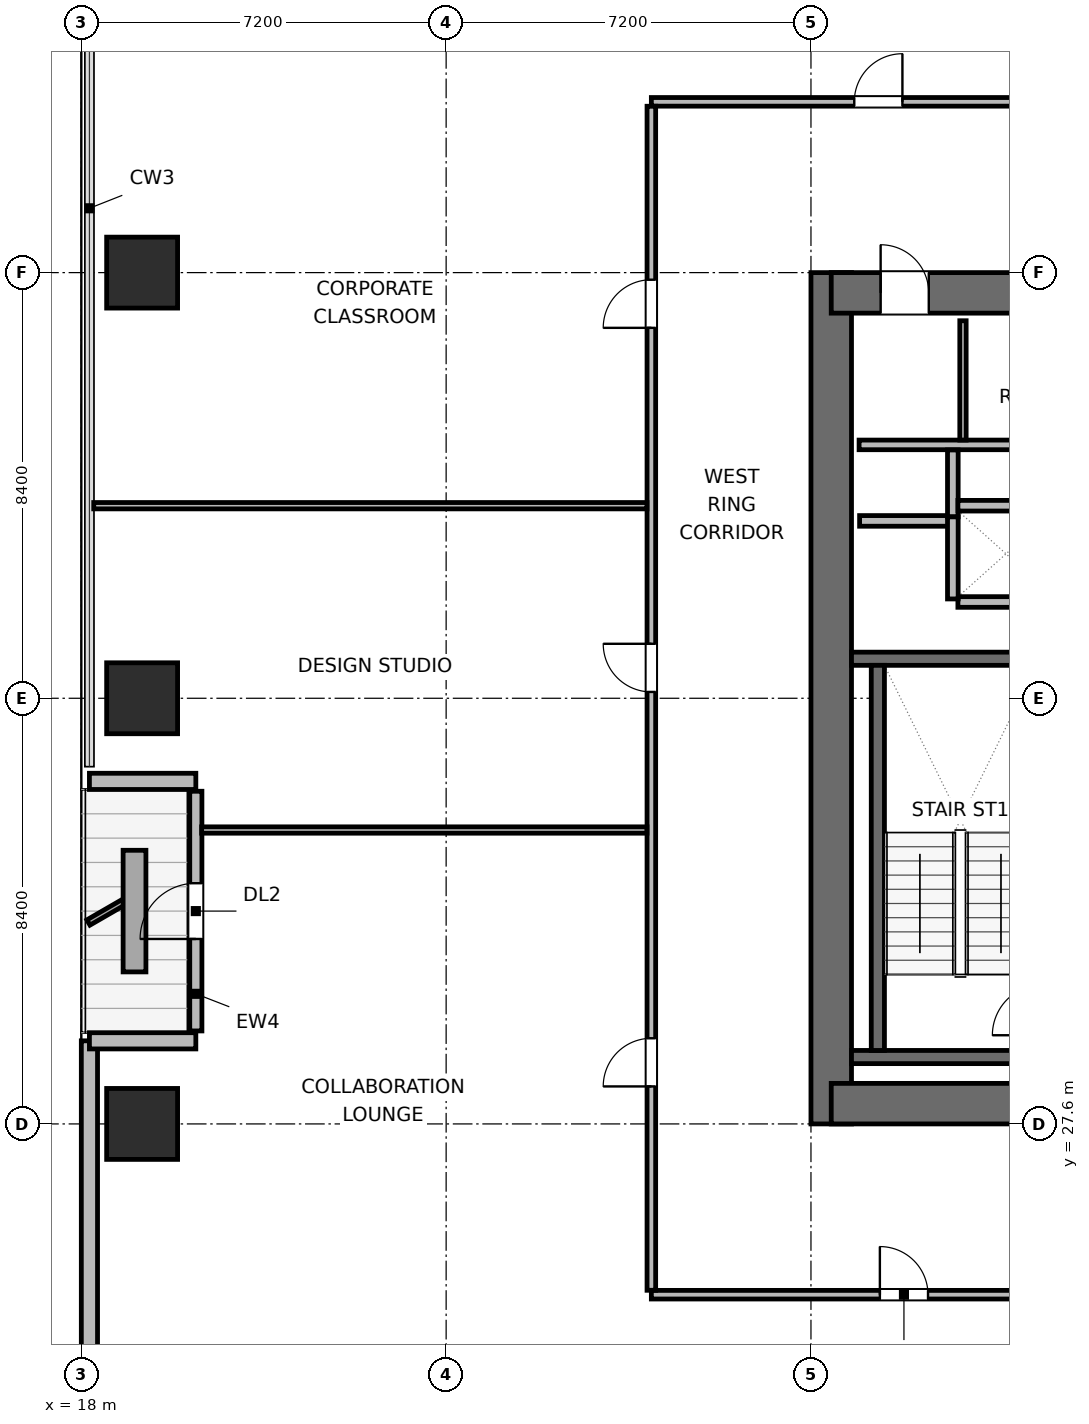
"""IFC4 building model, lengths in metres.
Left out: names, types, materials, properties, quantities, classifications, styles, units other than length and angle.
Written with IfcOpenShell. Run it as: python <this file> out.ifc"""

import sys

from ifc_helpers import new_model, si_unit, direction, frame, frame_2d, origin, origin_2d, place, context, subcontext, project, spatial, rectangle, extrude, element, fill, save


model = new_model("IFC4")
c1 = context("Model", 3, precision=1e-05, world=origin(), true_north=direction((0.0, 1.0)))
c2 = subcontext(c1, "Body", "Model", "MODEL_VIEW")
j1 = project(units=[si_unit("LENGTHUNIT", "METRE"), si_unit("PLANEANGLEUNIT", "RADIAN")], contexts=[c1])
p1 = place(None, origin())
s1 = spatial("IfcSite", under=j1, at=p1, CompositionType="ELEMENT")
p2 = place(p1, origin())
s2 = spatial("IfcBuilding", under=s1, at=p2, CompositionType="ELEMENT")
p3 = place(p2, frame((0.0, 0.0, 93.6)))
s3 = spatial("IfcBuildingStorey", under=s2, at=p3, CompositionType="ELEMENT", Elevation=93.6)
p4 = place(p3, frame((32.8, 27.6, 0.0), z_axis=(0.0, 0.0, 1.0), x_axis=(0.0, 1.0, 0.0)))
e1 = element("IfcWall", 1, at=p4, inside=s3, PredefinedType="SHEAR", context=c2, shape_type="SweptSolid", body=[
    extrude(rectangle(XDim=16.8, YDim=0.8, at=frame_2d((8.4, 0.0))), origin(), (0.0, 0.0, 1.0), 3.9),
])
p5 = place(p3, frame((32.8, 28.0, 0.0), z_axis=(0.0, 0.0, 1.0), x_axis=(1.0, 0.0, 0.0)))
e2 = element("IfcWall", 2, at=p5, inside=s3, PredefinedType="SHEAR", context=c2, shape_type="SweptSolid", body=[
    extrude(rectangle(XDim=9.2, YDim=0.8, at=frame_2d((4.6, 0.0))), origin(), (0.0, 0.0, 1.0), 3.9),
])
p6 = place(p5, frame((4.975, 0.0, 0.0)))
e3 = element("IfcOpeningElement", 3, at=p6, cuts=e2, PredefinedType="OPENING", context=c2, shape_type="SweptSolid", body=[
    extrude(rectangle(XDim=1.05, YDim=2.04, at=frame_2d((0.525, 1.02))), frame((0.0, 0.41, 0.0), z_axis=(0.0, -1.0, 0.0), x_axis=(1.0, 0.0, 0.0)), (0.0, 0.0, 1.0), 0.82),
])
p7 = place(p3, frame((32.8, 44.0, 0.0), z_axis=(0.0, 0.0, 1.0), x_axis=(1.0, 0.0, 0.0)))
e4 = element("IfcWall", 4, at=p7, inside=s3, PredefinedType="SHEAR", context=c2, shape_type="SweptSolid", body=[
    extrude(rectangle(XDim=9.2, YDim=0.8, at=frame_2d((4.6, 0.0))), origin(), (0.0, 0.0, 1.0), 3.9),
])
p8 = place(p7, frame((0.975, 0.0, 0.0)))
e5 = element("IfcOpeningElement", 5, at=p8, cuts=e4, PredefinedType="OPENING", context=c2, shape_type="SweptSolid", body=[
    extrude(rectangle(XDim=0.95, YDim=2.04, at=frame_2d((0.475, 1.02))), frame((0.0, 0.41, 0.0), z_axis=(0.0, -1.0, 0.0), x_axis=(1.0, 0.0, 0.0)), (0.0, 0.0, 1.0), 0.82),
])
p9 = place(p7, frame((4.225, 0.0, 0.0)))
e6 = element("IfcOpeningElement", 6, at=p9, cuts=e4, PredefinedType="OPENING", context=c2, shape_type="SweptSolid", body=[
    extrude(rectangle(XDim=0.9, YDim=2.02, at=frame_2d((0.45, 1.01))), frame((0.0, 0.41, 0.0), z_axis=(0.0, -1.0, 0.0), x_axis=(1.0, 0.0, 0.0)), (0.0, 0.0, 1.0), 0.82),
])
p10 = place(p7, frame((7.125, 0.0, 0.0)))
e7 = element("IfcOpeningElement", 7, at=p10, cuts=e4, PredefinedType="OPENING", context=c2, shape_type="SweptSolid", body=[
    extrude(rectangle(XDim=0.9, YDim=2.02, at=frame_2d((0.45, 1.01))), frame((0.0, 0.41, 0.0), z_axis=(0.0, -1.0, 0.0), x_axis=(1.0, 0.0, 0.0)), (0.0, 0.0, 1.0), 0.82),
])
for number, where, z_axis, x_axis in (
    (8, (33.2, 28.92, 0.0), (0.0, 0.0, 1.0), (1.0, 0.0, 0.0)),
    (9, (33.2, 36.78, 0.0), (0.0, 0.0, 1.0), (1.0, 0.0, 0.0)),
):
    element("IfcWall", number, at=place(p3, frame(where, z_axis=z_axis, x_axis=x_axis)), inside=s3, PredefinedType="SHEAR", context=c2, shape_type="SweptSolid", body=[
        extrude(rectangle(XDim=3.91, YDim=0.26, at=frame_2d((1.955, 0.0))), origin(), (0.0, 0.0, 1.0), 3.9),
    ])
p11 = place(p3, frame((33.72, 29.05, 0.0), z_axis=(0.0, 0.0, 1.0), x_axis=(0.0, 1.0, 0.0)))
e10 = element("IfcWall", 10, at=p11, inside=s3, PredefinedType="SHEAR", context=c2, shape_type="SweptSolid", body=[
    extrude(rectangle(XDim=7.6, YDim=0.26, at=frame_2d((3.8, 0.0))), origin(), (0.0, 0.0, 1.0), 3.9),
])
for number, where, z_axis, x_axis in (
    (11, (19.2, 27.6, 0.0), (0.0, 0.0, 1.0), (1.0, 0.0, 0.0)),
    (12, (19.2, 36.0, 0.0), (0.0, 0.0, 1.0), (1.0, 0.0, 0.0)),
    (13, (19.2, 44.4, 0.0), (0.0, 0.0, 1.0), (1.0, 0.0, 0.0)),
):
    element("IfcColumn", number, at=place(p3, frame(where, z_axis=z_axis, x_axis=x_axis)), inside=s3, PredefinedType="COLUMN", context=c2, shape_type="SweptSolid", body=[
        extrude(rectangle(XDim=1.4, YDim=1.4, at=origin_2d()), origin(), (0.0, 0.0, 1.0), 3.9),
    ])
p12 = place(p3, frame((18.16, 15.021, 0.0), z_axis=(0.0, 0.0, 1.0), x_axis=(0.0, 1.0, 0.0)))
e14 = element("IfcWall", 14, at=p12, inside=s3, PredefinedType="SOLIDWALL", context=c2, shape_type="SweptSolid", body=[
    extrude(rectangle(XDim=14.219, YDim=0.32, at=frame_2d((7.109, 0.0))), origin(), (0.0, 0.0, 1.0), 3.64),
])
p13 = place(p3, frame((18.16, 29.24, 0.0), z_axis=(0.0, 0.0, 1.0), x_axis=(1.0, 0.0, 0.0)))
e15 = element("IfcWall", 15, at=p13, inside=s3, PredefinedType="SOLIDWALL", context=c2, shape_type="SweptSolid", body=[
    extrude(rectangle(XDim=2.1, YDim=0.32, at=frame_2d((1.05, 0.0))), origin(), (0.0, 0.0, 1.0), 2.875),
])
p14 = place(p3, frame((20.26, 29.435, 0.0), z_axis=(0.0, 0.0, 1.0), x_axis=(0.0, 1.0, 0.0)))
e16 = element("IfcWall", 16, at=p14, inside=s3, PredefinedType="SOLIDWALL", context=c2, shape_type="SweptSolid", body=[
    extrude(rectangle(XDim=4.73, YDim=0.24, at=frame_2d((2.365, 0.0))), origin(), (0.0, 0.0, 1.0), 3.162),
])
p15 = place(p14, frame((1.815, 0.0, 0.0)))
e17 = element("IfcOpeningElement", 17, at=p15, cuts=e16, PredefinedType="OPENING", context=c2, shape_type="SweptSolid", body=[
    extrude(rectangle(XDim=1.1, YDim=2.04, at=frame_2d((0.55, 1.02))), frame((0.0, 0.13, 0.0), z_axis=(0.0, -1.0, 0.0), x_axis=(1.0, 0.0, 0.0)), (0.0, 0.0, 1.0), 0.26),
])
p16 = place(p3, frame((20.26, 34.36, 0.0), z_axis=(0.0, 0.0, 1.0), x_axis=(-1.0, 0.0, 0.0)))
e18 = element("IfcWall", 18, at=p16, inside=s3, PredefinedType="SOLIDWALL", context=c2, shape_type="SweptSolid", body=[
    extrude(rectangle(XDim=2.1, YDim=0.32, at=frame_2d((1.05, 0.0))), origin(), (0.0, 0.0, 1.0), 2.875),
])
p17 = place(p3, frame((33.35, 41.0, 0.0), z_axis=(0.0, 0.0, 1.0), x_axis=(1.0, 0.0, 0.0)))
e19 = element("IfcWall", 19, at=p17, inside=s3, PredefinedType="PLUMBINGWALL", context=c2, shape_type="SweptSolid", body=[
    extrude(rectangle(XDim=8.1, YDim=0.19, at=frame_2d((4.05, 0.0))), origin(), (0.0, 0.0, 1.0), 3.64),
])
p18 = place(p3, frame((35.4, 41.095, 0.0), z_axis=(0.0, 0.0, 1.0), x_axis=(0.0, 1.0, 0.0)))
e20 = element("IfcWall", 20, at=p18, inside=s3, PredefinedType="PARTITIONING", context=c2, shape_type="SweptSolid", body=[
    extrude(rectangle(XDim=2.355, YDim=0.125, at=frame_2d((1.177, 0.0))), origin(), (0.0, 0.0, 1.0), 3.64),
])
p19 = place(p3, frame((33.36, 39.5, 0.0), z_axis=(0.0, 0.0, 1.0), x_axis=(1.0, 0.0, 0.0)))
e21 = element("IfcWall", 21, at=p19, inside=s3, PredefinedType="PARTITIONING", context=c2, shape_type="SweptSolid", body=[
    extrude(rectangle(XDim=1.86, YDim=0.21, at=frame_2d((0.93, 0.0))), origin(), (0.0, 0.0, 1.0), 3.64),
])
p20 = place(p3, frame((35.2, 39.58, 0.0), z_axis=(0.0, 0.0, 1.0), x_axis=(0.0, 1.0, 0.0)))
e22 = element("IfcWall", 22, at=p20, inside=s3, PredefinedType="PARTITIONING", context=c2, shape_type="SweptSolid", body=[
    extrude(rectangle(XDim=1.32, YDim=0.21, at=frame_2d((0.66, 0.0))), origin(), (0.0, 0.0, 1.0), 3.64),
])
for number, where, z_axis, x_axis in (
    (23, (35.3, 37.9, 0.0), (0.0, 0.0, 1.0), (1.0, 0.0, 0.0)),
    (24, (35.3, 39.8, 0.0), (0.0, 0.0, 1.0), (1.0, 0.0, 0.0)),
):
    element("IfcWall", number, at=place(p3, frame(where, z_axis=z_axis, x_axis=x_axis)), inside=s3, PredefinedType="PARTITIONING", context=c2, shape_type="SweptSolid", body=[
        extrude(rectangle(XDim=1.9, YDim=0.21, at=frame_2d((0.95, 0.0))), origin(), (0.0, 0.0, 1.0), 3.64),
    ])
p21 = place(p3, frame((35.2, 37.96, 0.0), z_axis=(0.0, 0.0, 1.0), x_axis=(0.0, 1.0, 0.0)))
e25 = element("IfcWall", 25, at=p21, inside=s3, PredefinedType="PARTITIONING", context=c2, shape_type="SweptSolid", body=[
    extrude(rectangle(XDim=1.62, YDim=0.21, at=frame_2d((0.81, 0.0))), origin(), (0.0, 0.0, 1.0), 3.64),
])
p22 = place(p3, frame((29.25, 24.23, 0.0), z_axis=(0.0, 0.0, 1.0), x_axis=(1.0, 0.0, 0.0)))
e26 = element("IfcWall", 26, at=p22, inside=s3, PredefinedType="PARTITIONING", context=c2, shape_type="SweptSolid", body=[
    extrude(rectangle(XDim=37.5, YDim=0.17, at=frame_2d((18.75, 0.0))), origin(), (0.0, 0.0, 1.0), 3.64),
])
p23 = place(p22, frame((4.51, 0.0, 0.0)))
e27 = element("IfcOpeningElement", 27, at=p23, cuts=e26, PredefinedType="OPENING", context=c2, shape_type="SweptSolid", body=[
    extrude(rectangle(XDim=0.95, YDim=2.04, at=frame_2d((0.475, 1.02))), frame((0.0, 0.095, 0.0), z_axis=(0.0, -1.0, 0.0), x_axis=(1.0, 0.0, 0.0)), (0.0, 0.0, 1.0), 0.19),
])
p24 = place(p22, frame((13.885, 0.0, 0.0)))
e28 = element("IfcOpeningElement", 28, at=p24, cuts=e26, PredefinedType="OPENING", context=c2, shape_type="SweptSolid", body=[
    extrude(rectangle(XDim=0.95, YDim=2.04, at=frame_2d((0.475, 1.02))), frame((0.0, 0.095, 0.0), z_axis=(0.0, -1.0, 0.0), x_axis=(1.0, 0.0, 0.0)), (0.0, 0.0, 1.0), 0.19),
])
p25 = place(p22, frame((22.66, 0.0, 0.0)))
e29 = element("IfcOpeningElement", 29, at=p25, cuts=e26, PredefinedType="OPENING", context=c2, shape_type="SweptSolid", body=[
    extrude(rectangle(XDim=0.95, YDim=2.04, at=frame_2d((0.475, 1.02))), frame((0.0, 0.095, 0.0), z_axis=(0.0, -1.0, 0.0), x_axis=(1.0, 0.0, 0.0)), (0.0, 0.0, 1.0), 0.19),
])
p26 = place(p22, frame((32.035, 0.0, 0.0)))
e30 = element("IfcOpeningElement", 30, at=p26, cuts=e26, PredefinedType="OPENING", context=c2, shape_type="SweptSolid", body=[
    extrude(rectangle(XDim=0.95, YDim=2.04, at=frame_2d((0.475, 1.02))), frame((0.0, 0.095, 0.0), z_axis=(0.0, -1.0, 0.0), x_axis=(1.0, 0.0, 0.0)), (0.0, 0.0, 1.0), 0.19),
])
p27 = place(p3, frame((29.25, 47.77, 0.0), z_axis=(0.0, 0.0, 1.0), x_axis=(1.0, 0.0, 0.0)))
e31 = element("IfcWall", 31, at=p27, inside=s3, PredefinedType="PARTITIONING", context=c2, shape_type="SweptSolid", body=[
    extrude(rectangle(XDim=37.5, YDim=0.17, at=frame_2d((18.75, 0.0))), origin(), (0.0, 0.0, 1.0), 3.64),
])
p28 = place(p27, frame((4.005, 0.0, 0.0)))
e32 = element("IfcOpeningElement", 32, at=p28, cuts=e31, PredefinedType="OPENING", context=c2, shape_type="SweptSolid", body=[
    extrude(rectangle(XDim=0.95, YDim=2.04, at=frame_2d((0.475, 1.02))), frame((0.0, 0.095, 0.0), z_axis=(0.0, -1.0, 0.0), x_axis=(1.0, 0.0, 0.0)), (0.0, 0.0, 1.0), 0.19),
])
p29 = place(p27, frame((10.07, 0.0, 0.0)))
e33 = element("IfcOpeningElement", 33, at=p29, cuts=e31, PredefinedType="OPENING", context=c2, shape_type="SweptSolid", body=[
    extrude(rectangle(XDim=0.95, YDim=2.04, at=frame_2d((0.475, 1.02))), frame((0.0, 0.095, 0.0), z_axis=(0.0, -1.0, 0.0), x_axis=(1.0, 0.0, 0.0)), (0.0, 0.0, 1.0), 0.19),
])
p30 = place(p27, frame((17.165, 0.0, 0.0)))
e34 = element("IfcOpeningElement", 34, at=p30, cuts=e31, PredefinedType="OPENING", context=c2, shape_type="SweptSolid", body=[
    extrude(rectangle(XDim=0.95, YDim=2.04, at=frame_2d((0.475, 1.02))), frame((0.0, 0.095, 0.0), z_axis=(0.0, -1.0, 0.0), x_axis=(1.0, 0.0, 0.0)), (0.0, 0.0, 1.0), 0.19),
])
p31 = place(p27, frame((25.37, 0.0, 0.0)))
e35 = element("IfcOpeningElement", 35, at=p31, cuts=e31, PredefinedType="OPENING", context=c2, shape_type="SweptSolid", body=[
    extrude(rectangle(XDim=0.95, YDim=2.04, at=frame_2d((0.475, 1.02))), frame((0.0, 0.095, 0.0), z_axis=(0.0, -1.0, 0.0), x_axis=(1.0, 0.0, 0.0)), (0.0, 0.0, 1.0), 0.19),
])
p32 = place(p27, frame((32.545, 0.0, 0.0)))
e36 = element("IfcOpeningElement", 36, at=p32, cuts=e31, PredefinedType="OPENING", context=c2, shape_type="SweptSolid", body=[
    extrude(rectangle(XDim=0.95, YDim=2.04, at=frame_2d((0.475, 1.02))), frame((0.0, 0.095, 0.0), z_axis=(0.0, -1.0, 0.0), x_axis=(1.0, 0.0, 0.0)), (0.0, 0.0, 1.0), 0.19),
])
p33 = place(p3, frame((29.25, 24.317, 0.0), z_axis=(0.0, 0.0, 1.0), x_axis=(0.0, 1.0, 0.0)))
e37 = element("IfcWall", 37, at=p33, inside=s3, PredefinedType="PARTITIONING", context=c2, shape_type="SweptSolid", body=[
    extrude(rectangle(XDim=23.366, YDim=0.17, at=frame_2d((11.683, 0.0))), origin(), (0.0, 0.0, 1.0), 3.64),
])
p34 = place(p33, frame((4.023, 0.0, 0.0)))
e38 = element("IfcOpeningElement", 38, at=p34, cuts=e37, PredefinedType="OPENING", context=c2, shape_type="SweptSolid", body=[
    extrude(rectangle(XDim=0.95, YDim=2.04, at=frame_2d((0.475, 1.02))), frame((0.0, 0.095, 0.0), z_axis=(0.0, -1.0, 0.0), x_axis=(1.0, 0.0, 0.0)), (0.0, 0.0, 1.0), 0.19),
])
p35 = place(p33, frame((11.808, 0.0, 0.0)))
e39 = element("IfcOpeningElement", 39, at=p35, cuts=e37, PredefinedType="OPENING", context=c2, shape_type="SweptSolid", body=[
    extrude(rectangle(XDim=0.95, YDim=2.04, at=frame_2d((0.475, 1.02))), frame((0.0, 0.095, 0.0), z_axis=(0.0, -1.0, 0.0), x_axis=(1.0, 0.0, 0.0)), (0.0, 0.0, 1.0), 0.19),
])
p36 = place(p33, frame((18.993, 0.0, 0.0)))
e40 = element("IfcOpeningElement", 40, at=p36, cuts=e37, PredefinedType="OPENING", context=c2, shape_type="SweptSolid", body=[
    extrude(rectangle(XDim=0.95, YDim=2.04, at=frame_2d((0.475, 1.02))), frame((0.0, 0.095, 0.0), z_axis=(0.0, -1.0, 0.0), x_axis=(1.0, 0.0, 0.0)), (0.0, 0.0, 1.0), 0.19),
])
p37 = place(p3, frame((20.375, 33.4, 0.0), z_axis=(0.0, 0.0, 1.0), x_axis=(1.0, 0.0, 0.0)))
e41 = element("IfcWall", 41, at=p37, inside=s3, PredefinedType="PARTITIONING", context=c2, shape_type="SweptSolid", body=[
    extrude(rectangle(XDim=8.788, YDim=0.125, at=frame_2d((4.394, 0.0))), origin(), (0.0, 0.0, 1.0), 3.64),
])
p38 = place(p3, frame((18.245, 39.8, 0.0), z_axis=(0.0, 0.0, 1.0), x_axis=(1.0, 0.0, 0.0)))
e42 = element("IfcWall", 42, at=p38, inside=s3, PredefinedType="PARTITIONING", context=c2, shape_type="SweptSolid", body=[
    extrude(rectangle(XDim=10.918, YDim=0.125, at=frame_2d((5.459, 0.0))), origin(), (0.0, 0.0, 1.0), 3.64),
])
p39 = place(p15, origin())
e43 = element("IfcDoor", 43, at=p39, inside=s3, OperationType="SINGLE_SWING_LEFT", PredefinedType="DOOR", context=c2, shape_type="SweptSolid", body=[
    extrude(rectangle(XDim=1.1, YDim=2.04, at=frame_2d((0.55, 1.02))), frame((0.0, 0.025, 0.0), z_axis=(0.0, -1.0, 0.0), x_axis=(1.0, 0.0, 0.0)), (0.0, 0.0, 1.0), 0.05),
])
fill(e17, e43)
p40 = place(p8, origin())
e44 = element("IfcDoor", 44, at=p40, inside=s3, OperationType="SINGLE_SWING_LEFT", PredefinedType="DOOR", context=c2, shape_type="SweptSolid", body=[
    extrude(rectangle(XDim=0.95, YDim=2.04, at=frame_2d((0.475, 1.02))), frame((0.0, 0.025, 0.0), z_axis=(0.0, -1.0, 0.0), x_axis=(1.0, 0.0, 0.0)), (0.0, 0.0, 1.0), 0.05),
])
fill(e5, e44)
p41 = place(p23, origin())
e45 = element("IfcDoor", 45, at=p41, inside=s3, OperationType="SINGLE_SWING_LEFT", PredefinedType="DOOR", context=c2, shape_type="SweptSolid", body=[
    extrude(rectangle(XDim=0.95, YDim=2.04, at=frame_2d((0.475, 1.02))), frame((0.0, 0.025, 0.0), z_axis=(0.0, -1.0, 0.0), x_axis=(1.0, 0.0, 0.0)), (0.0, 0.0, 1.0), 0.05),
])
fill(e27, e45)
p42 = place(p28, origin())
e46 = element("IfcDoor", 46, at=p42, inside=s3, OperationType="SINGLE_SWING_RIGHT", PredefinedType="DOOR", context=c2, shape_type="SweptSolid", body=[
    extrude(rectangle(XDim=0.95, YDim=2.04, at=frame_2d((0.475, 1.02))), frame((0.0, 0.025, 0.0), z_axis=(0.0, -1.0, 0.0), x_axis=(1.0, 0.0, 0.0)), (0.0, 0.0, 1.0), 0.05),
])
fill(e32, e46)
p43 = place(p34, origin())
e47 = element("IfcDoor", 47, at=p43, inside=s3, OperationType="SINGLE_SWING_LEFT", PredefinedType="DOOR", context=c2, shape_type="SweptSolid", body=[
    extrude(rectangle(XDim=0.95, YDim=2.04, at=frame_2d((0.475, 1.02))), frame((0.0, 0.025, 0.0), z_axis=(0.0, -1.0, 0.0), x_axis=(1.0, 0.0, 0.0)), (0.0, 0.0, 1.0), 0.05),
])
fill(e38, e47)
p44 = place(p35, origin())
e48 = element("IfcDoor", 48, at=p44, inside=s3, OperationType="SINGLE_SWING_RIGHT", PredefinedType="DOOR", context=c2, shape_type="SweptSolid", body=[
    extrude(rectangle(XDim=0.95, YDim=2.04, at=frame_2d((0.475, 1.02))), frame((0.0, 0.025, 0.0), z_axis=(0.0, -1.0, 0.0), x_axis=(1.0, 0.0, 0.0)), (0.0, 0.0, 1.0), 0.05),
])
fill(e39, e48)
p45 = place(p36, origin())
e49 = element("IfcDoor", 49, at=p45, inside=s3, OperationType="SINGLE_SWING_LEFT", PredefinedType="DOOR", context=c2, shape_type="SweptSolid", body=[
    extrude(rectangle(XDim=0.95, YDim=2.04, at=frame_2d((0.475, 1.02))), frame((0.0, 0.025, 0.0), z_axis=(0.0, -1.0, 0.0), x_axis=(1.0, 0.0, 0.0)), (0.0, 0.0, 1.0), 0.05),
])
fill(e40, e49)
save(model, sys.argv[1])
